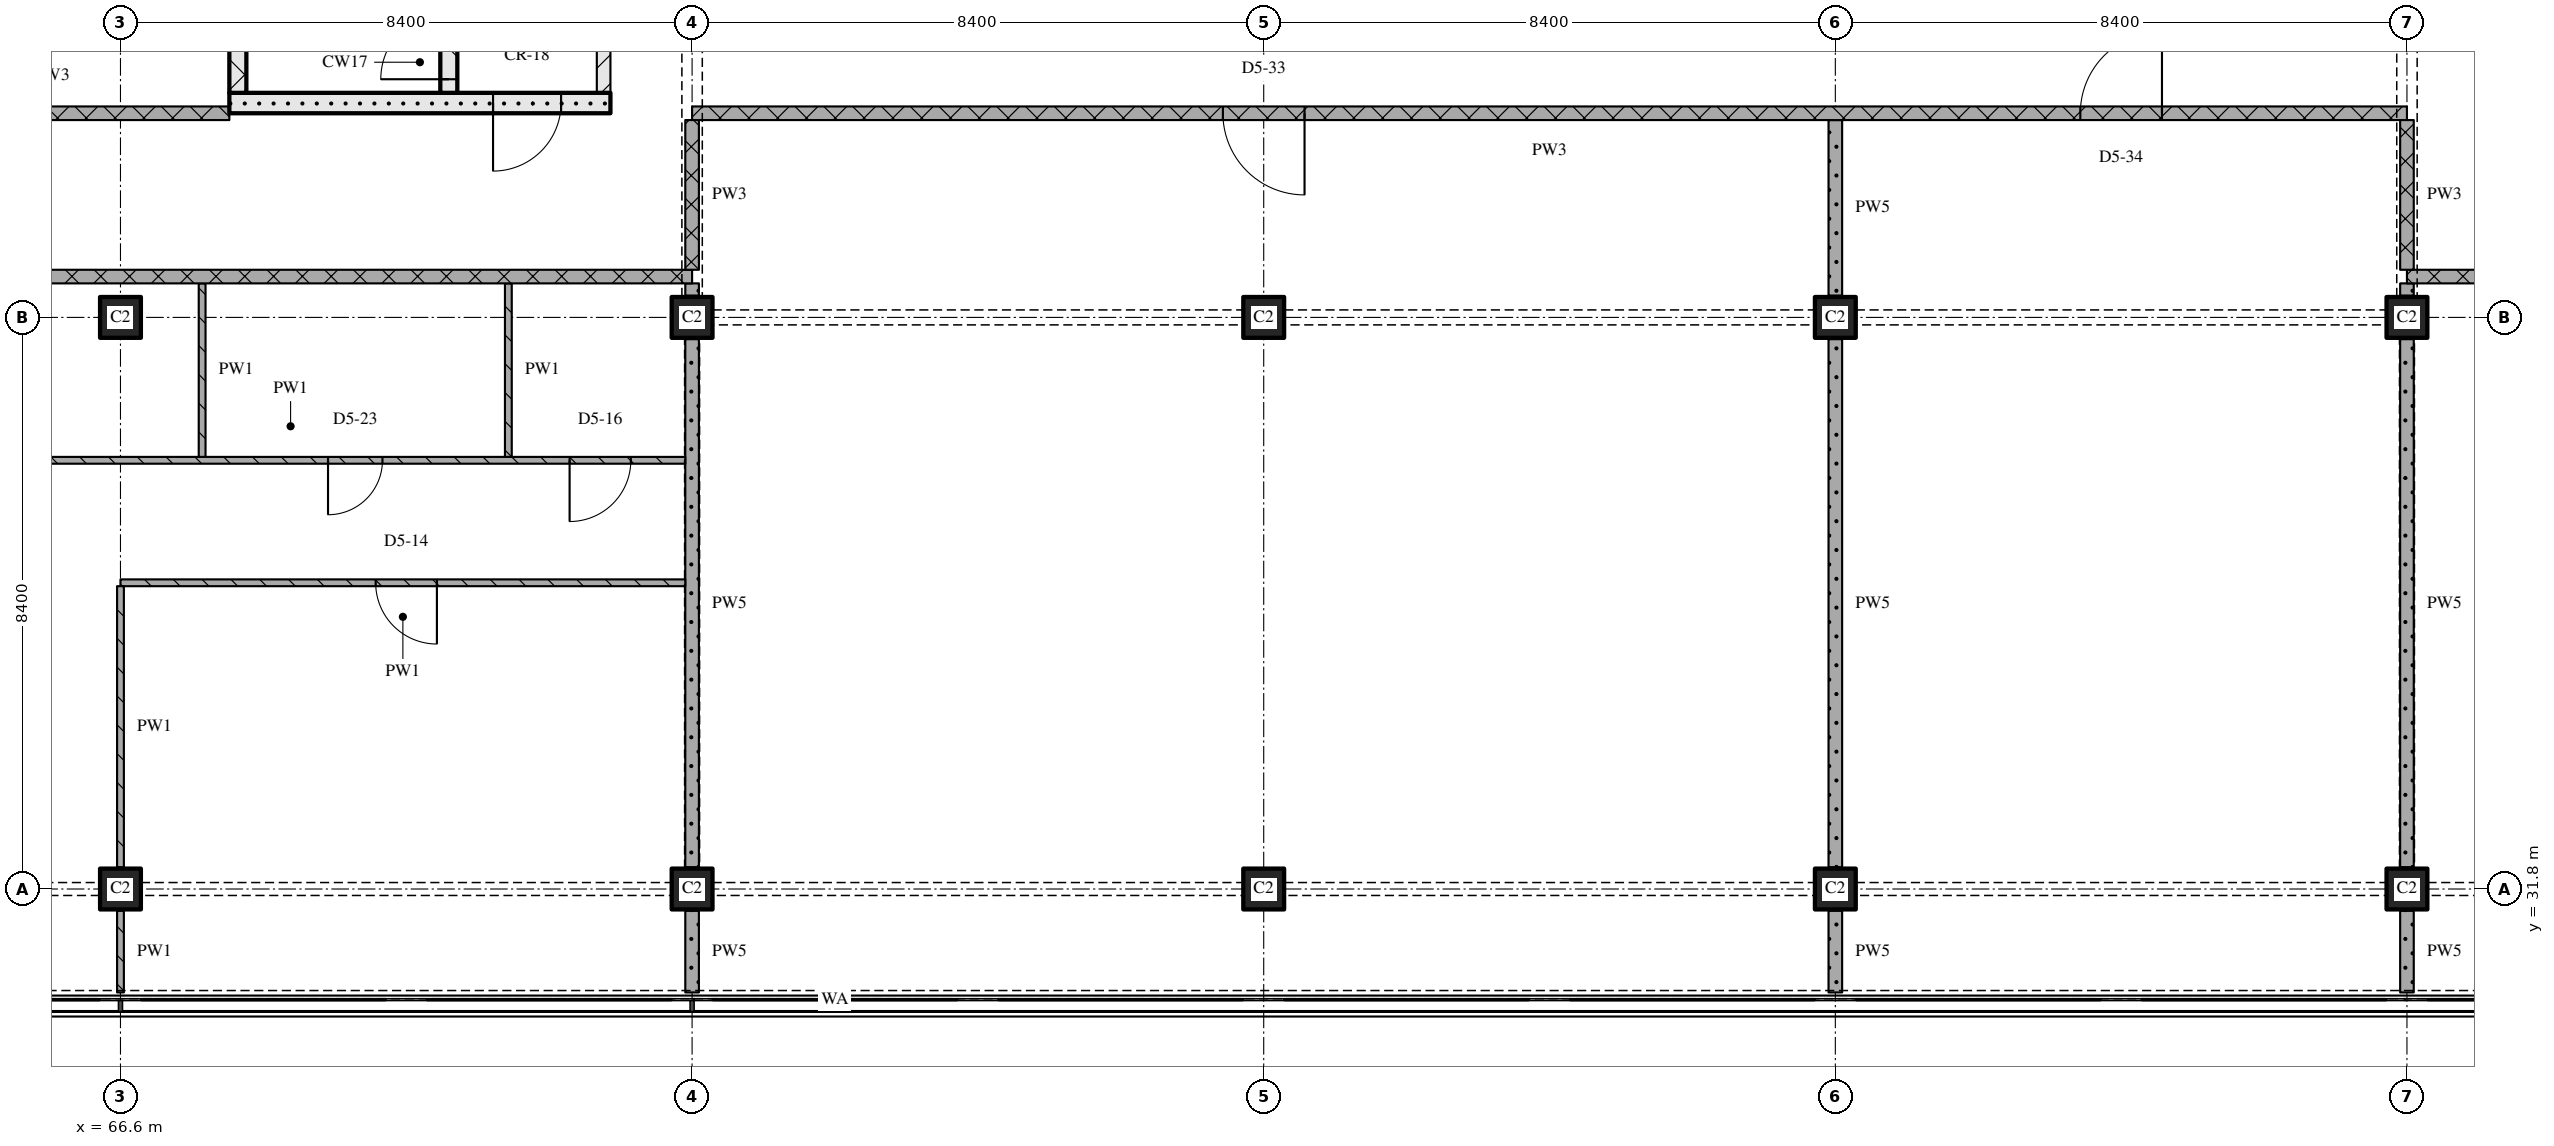
"""IFC4 building model, lengths in metres.
Left out: names, types, materials, properties, quantities, classifications, styles, units other than length and angle.
Written with IfcOpenShell. Run it as: python <this file> out.ifc"""

import sys

from ifc_helpers import new_model, si_unit, direction, frame, frame_2d, origin, origin_2d, place, context, subcontext, project, spatial, rectangle, extrude, element, fill, save


model = new_model("IFC4")
c1 = context("Model", 3, precision=1e-05, world=origin(), true_north=direction((0.0, 1.0)))
c2 = subcontext(c1, "Body", "Model", "MODEL_VIEW")
j1 = project(units=[si_unit("LENGTHUNIT", "METRE"), si_unit("PLANEANGLEUNIT", "RADIAN")], contexts=[c1])
p1 = place(None, origin())
s1 = spatial("IfcSite", under=j1, at=p1, CompositionType="ELEMENT")
p2 = place(p1, origin())
s2 = spatial("IfcBuilding", under=s1, at=p2, CompositionType="ELEMENT")
p3 = place(p2, frame((0.0, 0.0, 248.7)))
s3 = spatial("IfcBuildingStorey", under=s2, at=p3, CompositionType="ELEMENT", Elevation=248.7)
for number, where, z_axis, x_axis in (
    (1, (66.6, 31.8, 0.0), (0.0, 0.0, 1.0), (1.0, 0.0, 0.0)),
    (2, (66.6, 40.2, 0.0), (0.0, 0.0, 1.0), (1.0, 0.0, 0.0)),
    (3, (75.0, 31.8, 0.0), (0.0, 0.0, 1.0), (1.0, 0.0, 0.0)),
    (4, (75.0, 40.2, 0.0), (0.0, 0.0, 1.0), (1.0, 0.0, 0.0)),
    (5, (83.4, 31.8, 0.0), (0.0, 0.0, 1.0), (1.0, 0.0, 0.0)),
    (6, (83.4, 40.2, 0.0), (0.0, 0.0, 1.0), (1.0, 0.0, 0.0)),
    (7, (91.8, 31.8, 0.0), (0.0, 0.0, 1.0), (1.0, 0.0, 0.0)),
    (8, (91.8, 40.2, 0.0), (0.0, 0.0, 1.0), (1.0, 0.0, 0.0)),
    (9, (100.2, 31.8, 0.0), (0.0, 0.0, 1.0), (1.0, 0.0, 0.0)),
    (10, (100.2, 40.2, 0.0), (0.0, 0.0, 1.0), (1.0, 0.0, 0.0)),
):
    element("IfcColumn", number, at=place(p3, frame(where, z_axis=z_axis, x_axis=x_axis)), inside=s3, PredefinedType="COLUMN", context=c2, shape_type="SweptSolid", body=[
        extrude(rectangle(XDim=0.6, YDim=0.6, at=origin_2d()), origin(), (0.0, 0.0, 1.0), 3.6),
    ])
p4 = place(p3, frame((68.2, 43.35, 0.0), z_axis=(0.0, 0.0, 1.0), x_axis=(1.0, 0.0, 0.0)))
e11 = element("IfcWall", 11, at=p4, inside=s3, PredefinedType="SOLIDWALL", context=c2, shape_type="SweptSolid", body=[
    extrude(rectangle(XDim=5.6, YDim=0.3, at=frame_2d((2.8, 0.0))), origin(), (0.0, 0.0, 1.0), 3.3),
])
p5 = place(p4, frame((3.875, 0.0, 0.0)))
e12 = element("IfcOpeningElement", 12, at=p5, cuts=e11, PredefinedType="OPENING", context=c2, shape_type="SweptSolid", body=[
    extrude(rectangle(XDim=1.0, YDim=2.1, at=frame_2d((0.5, 1.05))), frame((0.0, 0.16, 0.0), z_axis=(0.0, -1.0, 0.0), x_axis=(1.0, 0.0, 0.0)), (0.0, 0.0, 1.0), 0.32),
])
p6 = place(p3, frame((68.325, 43.5, 0.0), z_axis=(0.0, 0.0, 1.0), x_axis=(0.0, 1.0, 0.0)))
e13 = element("IfcWall", 13, at=p6, inside=s3, PredefinedType="SOLIDWALL", context=c2, shape_type="SweptSolid", body=[
    extrude(rectangle(XDim=6.9, YDim=0.25, at=frame_2d((3.45, 0.0))), origin(), (0.0, 0.0, 1.0), 3.3),
])
p7 = place(p3, frame((71.425, 43.5, 0.0), z_axis=(0.0, 0.0, 1.0), x_axis=(0.0, 1.0, 0.0)))
e14 = element("IfcWall", 14, at=p7, inside=s3, PredefinedType="SOLIDWALL", context=c2, shape_type="SweptSolid", body=[
    extrude(rectangle(XDim=6.9, YDim=0.25, at=frame_2d((3.45, 0.0))), origin(), (0.0, 0.0, 1.0), 3.3),
])
p8 = place(p7, frame((0.2, 0.0, 0.0)))
e15 = element("IfcOpeningElement", 15, at=p8, cuts=e14, PredefinedType="OPENING", context=c2, shape_type="SweptSolid", body=[
    extrude(rectangle(XDim=1.0, YDim=2.1, at=frame_2d((0.5, 1.05))), frame((0.0, 0.135, 0.0), z_axis=(0.0, -1.0, 0.0), x_axis=(1.0, 0.0, 0.0)), (0.0, 0.0, 1.0), 0.27),
])
p9 = place(p3, frame((73.7, 43.5, 0.0), z_axis=(0.0, 0.0, 1.0), x_axis=(0.0, 1.0, 0.0)))
e16 = element("IfcWall", 16, at=p9, inside=s3, PredefinedType="PARTITIONING", context=c2, shape_type="SweptSolid", body=[
    extrude(rectangle(XDim=6.9, YDim=0.2, at=frame_2d((3.45, 0.0))), origin(), (0.0, 0.0, 1.0), 3.3),
])
p10 = place(p9, frame((1.0, 0.0, 0.0)))
e17 = element("IfcOpeningElement", 17, at=p10, cuts=e16, PredefinedType="OPENING", context=c2, shape_type="SweptSolid", body=[
    extrude(rectangle(XDim=1.0, YDim=2.1, at=frame_2d((0.5, 1.05))), frame((0.0, 0.11, 0.0), z_axis=(0.0, -1.0, 0.0), x_axis=(1.0, 0.0, 0.0)), (0.0, 0.0, 1.0), 0.22),
])
p11 = place(p3, frame((74.9, 36.3, 0.0), z_axis=(0.0, 0.0, 1.0), x_axis=(-1.0, 0.0, 0.0)))
e18 = element("IfcWall", 18, at=p11, inside=s3, PredefinedType="PARTITIONING", context=c2, shape_type="SweptSolid", body=[
    extrude(rectangle(XDim=8.3, YDim=0.1, at=frame_2d((4.15, 0.0))), origin(), (0.0, 0.0, 1.0), 3.3),
])
p12 = place(p11, frame((3.65, 0.0, 0.0)))
e19 = element("IfcOpeningElement", 19, at=p12, cuts=e18, PredefinedType="OPENING", context=c2, shape_type="SweptSolid", body=[
    extrude(rectangle(XDim=0.9, YDim=2.1, at=frame_2d((0.45, 1.05))), frame((0.0, 0.06, 0.0), z_axis=(0.0, -1.0, 0.0), x_axis=(1.0, 0.0, 0.0)), (0.0, 0.0, 1.0), 0.12),
])
p13 = place(p3, frame((63.3, 38.1, 0.0), z_axis=(0.0, 0.0, 1.0), x_axis=(1.0, 0.0, 0.0)))
e20 = element("IfcWall", 20, at=p13, inside=s3, PredefinedType="PARTITIONING", context=c2, shape_type="SweptSolid", body=[
    extrude(rectangle(XDim=11.6, YDim=0.1, at=frame_2d((5.8, 0.0))), origin(), (0.0, 0.0, 1.0), 3.3),
])
p14 = place(p13, frame((6.35, 0.0, 0.0)))
e21 = element("IfcOpeningElement", 21, at=p14, cuts=e20, PredefinedType="OPENING", context=c2, shape_type="SweptSolid", body=[
    extrude(rectangle(XDim=0.8, YDim=2.1, at=frame_2d((0.4, 1.05))), frame((0.0, 0.06, 0.0), z_axis=(0.0, -1.0, 0.0), x_axis=(1.0, 0.0, 0.0)), (0.0, 0.0, 1.0), 0.12),
])
p15 = place(p13, frame((9.9, 0.0, 0.0)))
e22 = element("IfcOpeningElement", 22, at=p15, cuts=e20, PredefinedType="OPENING", context=c2, shape_type="SweptSolid", body=[
    extrude(rectangle(XDim=0.9, YDim=2.1, at=frame_2d((0.45, 1.05))), frame((0.0, 0.06, 0.0), z_axis=(0.0, -1.0, 0.0), x_axis=(1.0, 0.0, 0.0)), (0.0, 0.0, 1.0), 0.12),
])
p16 = place(p3, frame((75.0, 40.8, 0.0), z_axis=(0.0, 0.0, 1.0), x_axis=(-1.0, 0.0, 0.0)))
e23 = element("IfcWall", 23, at=p16, inside=s3, PredefinedType="PARTITIONING", context=c2, shape_type="SweptSolid", body=[
    extrude(rectangle(XDim=24.38, YDim=0.2, at=frame_2d((12.19, 0.0))), origin(), (0.0, 0.0, 1.0), 3.3),
])
p17 = place(p16, frame((11.95, 0.0, 0.0)))
e24 = element("IfcOpeningElement", 24, at=p17, cuts=e23, PredefinedType="OPENING", context=c2, shape_type="SweptSolid", body=[
    extrude(rectangle(XDim=1.0, YDim=2.1, at=frame_2d((0.5, 1.05))), frame((0.0, 0.11, 0.0), z_axis=(0.0, -1.0, 0.0), x_axis=(1.0, 0.0, 0.0)), (0.0, 0.0, 1.0), 0.22),
])
p18 = place(p3, frame((124.58, 40.8, 0.0), z_axis=(0.0, 0.0, 1.0), x_axis=(-1.0, 0.0, 0.0)))
e25 = element("IfcWall", 25, at=p18, inside=s3, PredefinedType="PARTITIONING", context=c2, shape_type="SweptSolid", body=[
    extrude(rectangle(XDim=24.38, YDim=0.2, at=frame_2d((12.19, 0.0))), origin(), (0.0, 0.0, 1.0), 3.3),
])
p19 = place(p18, frame((2.452, 0.0, 0.0)))
e26 = element("IfcOpeningElement", 26, at=p19, cuts=e25, PredefinedType="OPENING", context=c2, shape_type="SweptSolid", body=[
    extrude(rectangle(XDim=1.2, YDim=2.1, at=frame_2d((0.6, 1.05))), frame((0.0, 0.11, 0.0), z_axis=(0.0, -1.0, 0.0), x_axis=(1.0, 0.0, 0.0)), (0.0, 0.0, 1.0), 0.22),
])
p20 = place(p18, frame((14.33, 0.0, 0.0)))
e27 = element("IfcOpeningElement", 27, at=p20, cuts=e25, PredefinedType="OPENING", context=c2, shape_type="SweptSolid", body=[
    extrude(rectangle(XDim=1.2, YDim=2.1, at=frame_2d((0.6, 1.05))), frame((0.0, 0.11, 0.0), z_axis=(0.0, -1.0, 0.0), x_axis=(1.0, 0.0, 0.0)), (0.0, 0.0, 1.0), 0.22),
])
p21 = place(p3, frame((63.0, 43.2, 0.0), z_axis=(0.0, 0.0, 1.0), x_axis=(1.0, 0.0, 0.0)))
e28 = element("IfcWall", 28, at=p21, inside=s3, PredefinedType="PARTITIONING", context=c2, shape_type="SweptSolid", body=[
    extrude(rectangle(XDim=5.2, YDim=0.2, at=frame_2d((2.6, 0.0))), origin(), (0.0, 0.0, 1.0), 3.3),
])
p22 = place(p3, frame((100.2, 43.2, 0.0), z_axis=(0.0, 0.0, 1.0), x_axis=(-1.0, 0.0, 0.0)))
e29 = element("IfcWall", 29, at=p22, inside=s3, PredefinedType="PARTITIONING", context=c2, shape_type="SweptSolid", body=[
    extrude(rectangle(XDim=25.2, YDim=0.2, at=frame_2d((12.6, 0.0))), origin(), (0.0, 0.0, 1.0), 3.3),
])
p23 = place(p22, frame((3.6, 0.0, 0.0)))
e30 = element("IfcOpeningElement", 30, at=p23, cuts=e29, PredefinedType="OPENING", context=c2, shape_type="SweptSolid", body=[
    extrude(rectangle(XDim=1.2, YDim=2.1, at=frame_2d((0.6, 1.05))), frame((0.0, 0.11, 0.0), z_axis=(0.0, -1.0, 0.0), x_axis=(1.0, 0.0, 0.0)), (0.0, 0.0, 1.0), 0.22),
])
p24 = place(p22, frame((16.2, 0.0, 0.0)))
e31 = element("IfcOpeningElement", 31, at=p24, cuts=e29, PredefinedType="OPENING", context=c2, shape_type="SweptSolid", body=[
    extrude(rectangle(XDim=1.2, YDim=2.1, at=frame_2d((0.6, 1.05))), frame((0.0, 0.11, 0.0), z_axis=(0.0, -1.0, 0.0), x_axis=(1.0, 0.0, 0.0)), (0.0, 0.0, 1.0), 0.22),
])
p25 = place(p3, frame((66.6, 31.48, 0.0), z_axis=(0.0, 0.0, 1.0), x_axis=(0.0, -1.0, 0.0)))
e32 = element("IfcWall", 32, at=p25, inside=s3, PredefinedType="PARTITIONING", context=c2, shape_type="SweptSolid", body=[
    extrude(rectangle(XDim=1.2, YDim=0.1, at=frame_2d((0.6, 0.0))), origin(), (0.0, 0.0, 1.0), 3.3),
])
p26 = place(p3, frame((66.6, 36.25, 0.0), z_axis=(0.0, 0.0, 1.0), x_axis=(0.0, -1.0, 0.0)))
e33 = element("IfcWall", 33, at=p26, inside=s3, PredefinedType="PARTITIONING", context=c2, shape_type="SweptSolid", body=[
    extrude(rectangle(XDim=4.13, YDim=0.1, at=frame_2d((2.065, 0.0))), origin(), (0.0, 0.0, 1.0), 3.3),
])
for number, where, z_axis, x_axis in (
    (34, (67.8, 40.7, 0.0), (0.0, 0.0, 1.0), (0.0, -1.0, 0.0)),
    (35, (72.3, 40.7, 0.0), (0.0, 0.0, 1.0), (0.0, -1.0, 0.0)),
):
    element("IfcWall", number, at=place(p3, frame(where, z_axis=z_axis, x_axis=x_axis)), inside=s3, PredefinedType="PARTITIONING", context=c2, shape_type="SweptSolid", body=[
        extrude(rectangle(XDim=2.55, YDim=0.1, at=frame_2d((1.275, 0.0))), origin(), (0.0, 0.0, 1.0), 3.3),
    ])
p27 = place(p3, frame((75.0, 43.1, 0.0), z_axis=(0.0, 0.0, 1.0), x_axis=(0.0, -1.0, 0.0)))
e36 = element("IfcWall", 36, at=p27, inside=s3, PredefinedType="PARTITIONING", context=c2, shape_type="SweptSolid", body=[
    extrude(rectangle(XDim=2.2, YDim=0.2, at=frame_2d((1.1, 0.0))), origin(), (0.0, 0.0, 1.0), 2.51),
])
p28 = place(p3, frame((75.0, 31.48, 0.0), z_axis=(0.0, 0.0, 1.0), x_axis=(0.0, -1.0, 0.0)))
e37 = element("IfcWall", 37, at=p28, inside=s3, PredefinedType="PARTITIONING", context=c2, shape_type="SweptSolid", body=[
    extrude(rectangle(XDim=1.2, YDim=0.2, at=frame_2d((0.6, 0.0))), origin(), (0.0, 0.0, 1.0), 2.41),
])
p29 = place(p3, frame((75.0, 39.88, 0.0), z_axis=(0.0, 0.0, 1.0), x_axis=(0.0, -1.0, 0.0)))
e38 = element("IfcWall", 38, at=p29, inside=s3, PredefinedType="PARTITIONING", context=c2, shape_type="SweptSolid", body=[
    extrude(rectangle(XDim=7.76, YDim=0.2, at=frame_2d((3.88, 0.0))), origin(), (0.0, 0.0, 1.0), 2.7),
])
p30 = place(p3, frame((75.0, 40.7, 0.0), z_axis=(0.0, 0.0, 1.0), x_axis=(0.0, -1.0, 0.0)))
e39 = element("IfcWall", 39, at=p30, inside=s3, PredefinedType="PARTITIONING", context=c2, shape_type="SweptSolid", body=[
    extrude(rectangle(XDim=0.18, YDim=0.2, at=frame_2d((0.09, 0.0))), origin(), (0.0, 0.0, 1.0), 3.3),
])
p31 = place(p3, frame((91.8, 31.48, 0.0), z_axis=(0.0, 0.0, 1.0), x_axis=(0.0, -1.0, 0.0)))
e40 = element("IfcWall", 40, at=p31, inside=s3, PredefinedType="PARTITIONING", context=c2, shape_type="SweptSolid", body=[
    extrude(rectangle(XDim=1.2, YDim=0.2, at=frame_2d((0.6, 0.0))), origin(), (0.0, 0.0, 1.0), 3.3),
])
p32 = place(p3, frame((91.8, 39.88, 0.0), z_axis=(0.0, 0.0, 1.0), x_axis=(0.0, -1.0, 0.0)))
e41 = element("IfcWall", 41, at=p32, inside=s3, PredefinedType="PARTITIONING", context=c2, shape_type="SweptSolid", body=[
    extrude(rectangle(XDim=7.76, YDim=0.2, at=frame_2d((3.88, 0.0))), origin(), (0.0, 0.0, 1.0), 3.3),
])
p33 = place(p3, frame((91.8, 43.1, 0.0), z_axis=(0.0, 0.0, 1.0), x_axis=(0.0, -1.0, 0.0)))
e42 = element("IfcWall", 42, at=p33, inside=s3, PredefinedType="PARTITIONING", context=c2, shape_type="SweptSolid", body=[
    extrude(rectangle(XDim=2.58, YDim=0.2, at=frame_2d((1.29, 0.0))), origin(), (0.0, 0.0, 1.0), 3.3),
])
p34 = place(p3, frame((100.2, 43.1, 0.0), z_axis=(0.0, 0.0, 1.0), x_axis=(0.0, -1.0, 0.0)))
e43 = element("IfcWall", 43, at=p34, inside=s3, PredefinedType="PARTITIONING", context=c2, shape_type="SweptSolid", body=[
    extrude(rectangle(XDim=2.2, YDim=0.2, at=frame_2d((1.1, 0.0))), origin(), (0.0, 0.0, 1.0), 2.51),
])
p35 = place(p3, frame((100.2, 31.48, 0.0), z_axis=(0.0, 0.0, 1.0), x_axis=(0.0, -1.0, 0.0)))
e44 = element("IfcWall", 44, at=p35, inside=s3, PredefinedType="PARTITIONING", context=c2, shape_type="SweptSolid", body=[
    extrude(rectangle(XDim=1.2, YDim=0.2, at=frame_2d((0.6, 0.0))), origin(), (0.0, 0.0, 1.0), 2.41),
])
p36 = place(p3, frame((100.2, 39.88, 0.0), z_axis=(0.0, 0.0, 1.0), x_axis=(0.0, -1.0, 0.0)))
e45 = element("IfcWall", 45, at=p36, inside=s3, PredefinedType="PARTITIONING", context=c2, shape_type="SweptSolid", body=[
    extrude(rectangle(XDim=7.76, YDim=0.2, at=frame_2d((3.88, 0.0))), origin(), (0.0, 0.0, 1.0), 2.7),
])
p37 = place(p3, frame((100.2, 40.7, 0.0), z_axis=(0.0, 0.0, 1.0), x_axis=(0.0, -1.0, 0.0)))
e46 = element("IfcWall", 46, at=p37, inside=s3, PredefinedType="PARTITIONING", context=c2, shape_type="SweptSolid", body=[
    extrude(rectangle(XDim=0.18, YDim=0.2, at=frame_2d((0.09, 0.0))), origin(), (0.0, 0.0, 1.0), 3.3),
])
p38 = place(p5, origin())
e47 = element("IfcDoor", 47, at=p38, inside=s3, OperationType="SINGLE_SWING_RIGHT", PredefinedType="DOOR", context=c2, shape_type="SweptSolid", body=[
    extrude(rectangle(XDim=1.0, YDim=2.1, at=frame_2d((0.5, 1.05))), frame((0.0, 0.025, 0.0), z_axis=(0.0, -1.0, 0.0), x_axis=(1.0, 0.0, 0.0)), (0.0, 0.0, 1.0), 0.05),
])
fill(e12, e47)
p39 = place(p8, origin())
e48 = element("IfcDoor", 48, at=p39, inside=s3, OperationType="SINGLE_SWING_LEFT", PredefinedType="DOOR", context=c2, shape_type="SweptSolid", body=[
    extrude(rectangle(XDim=1.0, YDim=2.1, at=frame_2d((0.5, 1.05))), frame((0.0, 0.025, 0.0), z_axis=(0.0, -1.0, 0.0), x_axis=(1.0, 0.0, 0.0)), (0.0, 0.0, 1.0), 0.05),
])
fill(e15, e48)
p40 = place(p12, origin())
e49 = element("IfcDoor", 49, at=p40, inside=s3, OperationType="SINGLE_SWING_LEFT", PredefinedType="DOOR", context=c2, shape_type="SweptSolid", body=[
    extrude(rectangle(XDim=0.9, YDim=2.1, at=frame_2d((0.45, 1.05))), frame((0.0, 0.025, 0.0), z_axis=(0.0, -1.0, 0.0), x_axis=(1.0, 0.0, 0.0)), (0.0, 0.0, 1.0), 0.05),
])
fill(e19, e49)
p41 = place(p14, origin())
e50 = element("IfcDoor", 50, at=p41, inside=s3, OperationType="SINGLE_SWING_RIGHT", PredefinedType="DOOR", context=c2, shape_type="SweptSolid", body=[
    extrude(rectangle(XDim=0.8, YDim=2.1, at=frame_2d((0.4, 1.05))), frame((0.0, 0.025, 0.0), z_axis=(0.0, -1.0, 0.0), x_axis=(1.0, 0.0, 0.0)), (0.0, 0.0, 1.0), 0.05),
])
fill(e21, e50)
p42 = place(p15, origin())
e51 = element("IfcDoor", 51, at=p42, inside=s3, OperationType="SINGLE_SWING_RIGHT", PredefinedType="DOOR", context=c2, shape_type="SweptSolid", body=[
    extrude(rectangle(XDim=0.9, YDim=2.1, at=frame_2d((0.45, 1.05))), frame((0.0, 0.025, 0.0), z_axis=(0.0, -1.0, 0.0), x_axis=(1.0, 0.0, 0.0)), (0.0, 0.0, 1.0), 0.05),
])
fill(e22, e51)
p43 = place(p23, origin())
e52 = element("IfcDoor", 52, at=p43, inside=s3, OperationType="SINGLE_SWING_RIGHT", PredefinedType="DOOR", context=c2, shape_type="SweptSolid", body=[
    extrude(rectangle(XDim=1.2, YDim=2.1, at=frame_2d((0.6, 1.05))), frame((0.0, 0.025, 0.0), z_axis=(0.0, -1.0, 0.0), x_axis=(1.0, 0.0, 0.0)), (0.0, 0.0, 1.0), 0.05),
])
fill(e30, e52)
p44 = place(p24, origin())
e53 = element("IfcDoor", 53, at=p44, inside=s3, OperationType="SINGLE_SWING_LEFT", PredefinedType="DOOR", context=c2, shape_type="SweptSolid", body=[
    extrude(rectangle(XDim=1.2, YDim=2.1, at=frame_2d((0.6, 1.05))), frame((0.0, 0.025, 0.0), z_axis=(0.0, -1.0, 0.0), x_axis=(1.0, 0.0, 0.0)), (0.0, 0.0, 1.0), 0.05),
])
fill(e31, e53)
save(model, sys.argv[1])
